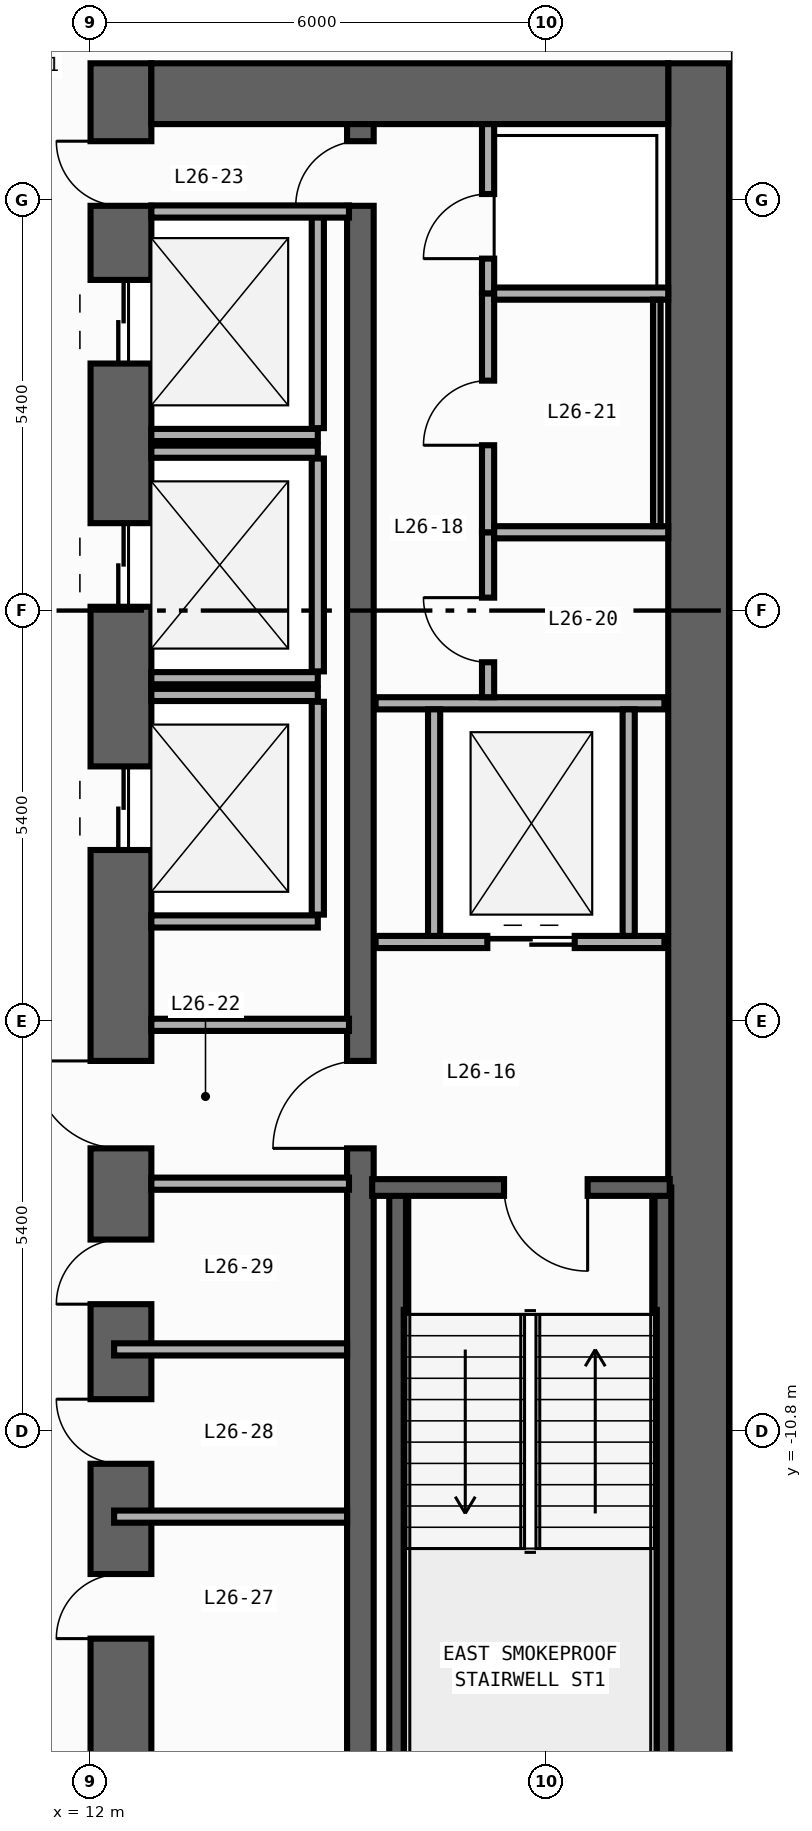
"""IFC4 building model, lengths in metres.
Left out: names, types, materials, properties, quantities, classifications, styles, units other than length and angle.
Written with IfcOpenShell. Run it as: python <this file> out.ifc"""

import sys

from ifc_helpers import new_model, si_unit, direction, frame, frame_2d, origin, place, context, subcontext, project, spatial, rectangle, extrude, element, fill, save


model = new_model("IFC4")
c1 = context("Model", 3, precision=1e-05, world=origin(), true_north=direction((0.0, 1.0)))
c2 = subcontext(c1, "Body", "Model", "MODEL_VIEW")
j1 = project(units=[si_unit("LENGTHUNIT", "METRE"), si_unit("PLANEANGLEUNIT", "RADIAN")], contexts=[c1])
p1 = place(None, origin())
s1 = spatial("IfcSite", under=j1, at=p1, CompositionType="ELEMENT")
p2 = place(p1, origin())
s2 = spatial("IfcBuilding", under=s1, at=p2, CompositionType="ELEMENT")
p3 = place(p2, frame((0.0, 0.0, 114.2)))
s3 = spatial("IfcBuildingStorey", under=s2, at=p3, CompositionType="ELEMENT", Elevation=114.2)
p4 = place(p3, frame((12.4, -19.8, 0.0), z_axis=(0.0, 0.0, 1.0), x_axis=(0.0, 1.0, 0.0)))
e1 = element("IfcWall", 1, at=p4, inside=s3, PredefinedType="SHEAR", context=c2, shape_type="SweptSolid", body=[
    extrude(rectangle(XDim=27.0, YDim=0.8, at=frame_2d((13.5, 0.0))), origin(), (0.0, 0.0, 1.0), 3.94),
])
p5 = place(p4, frame((23.05, 0.0, 0.0)))
e2 = element("IfcOpeningElement", 2, at=p5, cuts=e1, PredefinedType="OPENING", context=c2, shape_type="SweptSolid", body=[
    extrude(rectangle(XDim=1.1, YDim=2.2, at=frame_2d((0.55, 1.1))), frame((0.0, 0.41, 0.0), z_axis=(0.0, -1.0, 0.0), x_axis=(1.0, 0.0, 0.0)), (0.0, 0.0, 1.0), 0.82),
])
p6 = place(p4, frame((19.85, 0.0, 0.0)))
e3 = element("IfcOpeningElement", 3, at=p6, cuts=e1, PredefinedType="OPENING", context=c2, shape_type="SweptSolid", body=[
    extrude(rectangle(XDim=1.1, YDim=2.2, at=frame_2d((0.55, 1.1))), frame((0.0, 0.41, 0.0), z_axis=(0.0, -1.0, 0.0), x_axis=(1.0, 0.0, 0.0)), (0.0, 0.0, 1.0), 0.82),
])
p7 = place(p4, frame((16.65, 0.0, 0.0)))
e4 = element("IfcOpeningElement", 4, at=p7, cuts=e1, PredefinedType="OPENING", context=c2, shape_type="SweptSolid", body=[
    extrude(rectangle(XDim=1.1, YDim=2.2, at=frame_2d((0.55, 1.1))), frame((0.0, 0.41, 0.0), z_axis=(0.0, -1.0, 0.0), x_axis=(1.0, 0.0, 0.0)), (0.0, 0.0, 1.0), 0.82),
])
p8 = place(p4, frame((6.275, 0.0, 0.0)))
e5 = element("IfcOpeningElement", 5, at=p8, cuts=e1, PredefinedType="OPENING", context=c2, shape_type="SweptSolid", body=[
    extrude(rectangle(XDim=0.85, YDim=2.1, at=frame_2d((0.425, 1.05))), frame((0.0, 0.41, 0.0), z_axis=(0.0, -1.0, 0.0), x_axis=(1.0, 0.0, 0.0)), (0.0, 0.0, 1.0), 0.82),
])
p9 = place(p4, frame((8.575, 0.0, 0.0)))
e6 = element("IfcOpeningElement", 6, at=p9, cuts=e1, PredefinedType="OPENING", context=c2, shape_type="SweptSolid", body=[
    extrude(rectangle(XDim=0.85, YDim=2.1, at=frame_2d((0.425, 1.05))), frame((0.0, 0.41, 0.0), z_axis=(0.0, -1.0, 0.0), x_axis=(1.0, 0.0, 0.0)), (0.0, 0.0, 1.0), 0.82),
])
p10 = place(p4, frame((10.675, 0.0, 0.0)))
e7 = element("IfcOpeningElement", 7, at=p10, cuts=e1, PredefinedType="OPENING", context=c2, shape_type="SweptSolid", body=[
    extrude(rectangle(XDim=0.85, YDim=2.1, at=frame_2d((0.425, 1.05))), frame((0.0, 0.41, 0.0), z_axis=(0.0, -1.0, 0.0), x_axis=(1.0, 0.0, 0.0)), (0.0, 0.0, 1.0), 0.82),
])
p11 = place(p4, frame((12.725, 0.0, 0.0)))
e8 = element("IfcOpeningElement", 8, at=p11, cuts=e1, PredefinedType="OPENING", context=c2, shape_type="SweptSolid", body=[
    extrude(rectangle(XDim=1.15, YDim=2.2, at=frame_2d((0.575, 1.1))), frame((0.0, 0.41, 0.0), z_axis=(0.0, -1.0, 0.0), x_axis=(1.0, 0.0, 0.0)), (0.0, 0.0, 1.0), 0.82),
])
p12 = place(p4, frame((25.125, 0.0, 0.0)))
e9 = element("IfcOpeningElement", 9, at=p12, cuts=e1, PredefinedType="OPENING", context=c2, shape_type="SweptSolid", body=[
    extrude(rectangle(XDim=0.85, YDim=2.1, at=frame_2d((0.425, 1.05))), frame((0.0, 0.41, 0.0), z_axis=(0.0, -1.0, 0.0), x_axis=(1.0, 0.0, 0.0)), (0.0, 0.0, 1.0), 0.82),
])
p13 = place(p3, frame((20.0, -19.8, 0.0), z_axis=(0.0, 0.0, 1.0), x_axis=(0.0, 1.0, 0.0)))
e10 = element("IfcWall", 10, at=p13, inside=s3, PredefinedType="SHEAR", context=c2, shape_type="SweptSolid", body=[
    extrude(rectangle(XDim=27.0, YDim=0.8, at=frame_2d((13.5, 0.0))), origin(), (0.0, 0.0, 1.0), 3.94),
])
p14 = place(p3, frame((12.8, 6.8, 0.0), z_axis=(0.0, 0.0, 1.0), x_axis=(1.0, 0.0, 0.0)))
e11 = element("IfcWall", 11, at=p14, inside=s3, PredefinedType="SHEAR", context=c2, shape_type="SweptSolid", body=[
    extrude(rectangle(XDim=6.8, YDim=0.8, at=frame_2d((3.4, 0.0))), origin(), (0.0, 0.0, 1.0), 3.94),
])
p15 = place(p3, frame((15.55, -19.0, 0.0), z_axis=(0.0, 0.0, 1.0), x_axis=(0.0, 1.0, 0.0)))
e12 = element("IfcWall", 12, at=p15, inside=s3, PredefinedType="SHEAR", context=c2, shape_type="SweptSolid", body=[
    extrude(rectangle(XDim=25.4, YDim=0.35, at=frame_2d((12.7, 0.0))), origin(), (0.0, 0.0, 1.0), 3.94),
])
p16 = place(p15, frame((11.925, 0.0, 0.0)))
e13 = element("IfcOpeningElement", 13, at=p16, cuts=e12, PredefinedType="OPENING", context=c2, shape_type="SweptSolid", body=[
    extrude(rectangle(XDim=1.15, YDim=2.2, at=frame_2d((0.575, 1.1))), frame((0.0, 0.185, 0.0), z_axis=(0.0, -1.0, 0.0), x_axis=(1.0, 0.0, 0.0)), (0.0, 0.0, 1.0), 0.37),
])
p17 = place(p15, frame((24.325, 0.0, 0.0)))
e14 = element("IfcOpeningElement", 14, at=p17, cuts=e12, PredefinedType="OPENING", context=c2, shape_type="SweptSolid", body=[
    extrude(rectangle(XDim=0.85, YDim=2.1, at=frame_2d((0.425, 1.05))), frame((0.0, 0.185, 0.0), z_axis=(0.0, -1.0, 0.0), x_axis=(1.0, 0.0, 0.0)), (0.0, 0.0, 1.0), 0.37),
])
for number, where, z_axis, x_axis in (
    (15, (16.04, -18.89, 0.0), (0.0, 0.0, 1.0), (0.0, 1.0, 0.0)),
    (16, (19.53, -18.89, 0.0), (0.0, 0.0, 1.0), (0.0, 1.0, 0.0)),
):
    element("IfcWall", number, at=place(p3, frame(where, z_axis=z_axis, x_axis=x_axis)), inside=s3, PredefinedType="SHEAR", context=c2, shape_type="SweptSolid", body=[
        extrude(rectangle(XDim=11.3, YDim=0.22, at=frame_2d((5.65, 0.0))), origin(), (0.0, 0.0, 1.0), 3.94),
    ])
p18 = place(p3, frame((19.62, -7.59, 0.0), z_axis=(0.0, 0.0, 1.0), x_axis=(-1.0, 0.0, 0.0)))
e17 = element("IfcWall", 17, at=p18, inside=s3, PredefinedType="SHEAR", context=c2, shape_type="SweptSolid", body=[
    extrude(rectangle(XDim=3.915, YDim=0.22, at=frame_2d((1.958, 0.0))), origin(), (0.0, 0.0, 1.0), 3.94),
])
p19 = place(p18, frame((1.08, 0.0, 0.0)))
e18 = element("IfcOpeningElement", 18, at=p19, cuts=e17, PredefinedType="OPENING", context=c2, shape_type="SweptSolid", body=[
    extrude(rectangle(XDim=1.1, YDim=2.2, at=frame_2d((0.55, 1.1))), frame((0.0, 0.12, 0.0), z_axis=(0.0, -1.0, 0.0), x_axis=(1.0, 0.0, 0.0)), (0.0, 0.0, 1.0), 0.24),
])
p20 = place(p3, frame((12.8, 2.31, 0.0), z_axis=(0.0, 0.0, 1.0), x_axis=(1.0, 0.0, 0.0)))
e19 = element("IfcWall", 19, at=p20, inside=s3, PredefinedType="STANDARD", context=c2, shape_type="SweptSolid", body=[
    extrude(rectangle(XDim=2.19, YDim=0.16, at=frame_2d((1.095, 0.0))), origin(), (0.0, 0.0, 1.0), 3.94),
])
p21 = place(p3, frame((14.99, 2.4, 0.0), z_axis=(0.0, 0.0, 1.0), x_axis=(0.0, 1.0, 0.0)))
e20 = element("IfcWall", 20, at=p21, inside=s3, PredefinedType="STANDARD", context=c2, shape_type="SweptSolid", body=[
    extrude(rectangle(XDim=2.8, YDim=0.16, at=frame_2d((1.4, 0.0))), origin(), (0.0, 0.0, 1.0), 3.94),
])
for number, where, z_axis, x_axis in (
    (21, (12.8, -0.89, 0.0), (0.0, 0.0, 1.0), (1.0, 0.0, 0.0)),
    (22, (12.8, 2.09, 0.0), (0.0, 0.0, 1.0), (1.0, 0.0, 0.0)),
):
    element("IfcWall", number, at=place(p3, frame(where, z_axis=z_axis, x_axis=x_axis)), inside=s3, PredefinedType="STANDARD", context=c2, shape_type="SweptSolid", body=[
        extrude(rectangle(XDim=2.19, YDim=0.16, at=frame_2d((1.095, 0.0))), origin(), (0.0, 0.0, 1.0), 3.94),
    ])
p22 = place(p3, frame((14.99, -0.8, 0.0), z_axis=(0.0, 0.0, 1.0), x_axis=(0.0, 1.0, 0.0)))
e23 = element("IfcWall", 23, at=p22, inside=s3, PredefinedType="STANDARD", context=c2, shape_type="SweptSolid", body=[
    extrude(rectangle(XDim=2.8, YDim=0.16, at=frame_2d((1.4, 0.0))), origin(), (0.0, 0.0, 1.0), 3.94),
])
for number, where, z_axis, x_axis in (
    (24, (12.8, -4.09, 0.0), (0.0, 0.0, 1.0), (1.0, 0.0, 0.0)),
    (25, (12.8, -1.11, 0.0), (0.0, 0.0, 1.0), (1.0, 0.0, 0.0)),
):
    element("IfcWall", number, at=place(p3, frame(where, z_axis=z_axis, x_axis=x_axis)), inside=s3, PredefinedType="STANDARD", context=c2, shape_type="SweptSolid", body=[
        extrude(rectangle(XDim=2.19, YDim=0.16, at=frame_2d((1.095, 0.0))), origin(), (0.0, 0.0, 1.0), 3.94),
    ])
p23 = place(p3, frame((14.99, -4.0, 0.0), z_axis=(0.0, 0.0, 1.0), x_axis=(0.0, 1.0, 0.0)))
e26 = element("IfcWall", 26, at=p23, inside=s3, PredefinedType="STANDARD", context=c2, shape_type="SweptSolid", body=[
    extrude(rectangle(XDim=2.8, YDim=0.16, at=frame_2d((1.4, 0.0))), origin(), (0.0, 0.0, 1.0), 3.94),
])
p24 = place(p3, frame((15.75, -4.36, 0.0), z_axis=(0.0, 0.0, 1.0), x_axis=(1.0, 0.0, 0.0)))
e27 = element("IfcWall", 27, at=p24, inside=s3, PredefinedType="STANDARD", context=c2, shape_type="SweptSolid", body=[
    extrude(rectangle(XDim=3.8, YDim=0.16, at=frame_2d((1.9, 0.0))), origin(), (0.0, 0.0, 1.0), 3.94),
])
p25 = place(p24, frame((1.47, 0.0, 0.0)))
e28 = element("IfcOpeningElement", 28, at=p25, cuts=e27, PredefinedType="OPENING", context=c2, shape_type="SweptSolid", body=[
    extrude(rectangle(XDim=1.15, YDim=2.2, at=frame_2d((0.575, 1.1))), frame((0.0, 0.09, 0.0), z_axis=(0.0, -1.0, 0.0), x_axis=(1.0, 0.0, 0.0)), (0.0, 0.0, 1.0), 0.18),
])
p26 = place(p3, frame((15.75, -1.22, 0.0), z_axis=(0.0, 0.0, 1.0), x_axis=(1.0, 0.0, 0.0)))
e29 = element("IfcWall", 29, at=p26, inside=s3, PredefinedType="STANDARD", context=c2, shape_type="SweptSolid", body=[
    extrude(rectangle(XDim=3.8, YDim=0.16, at=frame_2d((1.9, 0.0))), origin(), (0.0, 0.0, 1.0), 3.94),
])
for number, where, z_axis, x_axis in (
    (30, (16.52, -4.28, 0.0), (0.0, 0.0, 1.0), (0.0, 1.0, 0.0)),
    (31, (19.08, -4.28, 0.0), (0.0, 0.0, 1.0), (0.0, 1.0, 0.0)),
):
    element("IfcWall", number, at=place(p3, frame(where, z_axis=z_axis, x_axis=x_axis)), inside=s3, PredefinedType="STANDARD", context=c2, shape_type="SweptSolid", body=[
        extrude(rectangle(XDim=2.98, YDim=0.16, at=frame_2d((1.49, 0.0))), origin(), (0.0, 0.0, 1.0), 3.94),
    ])
for number, where, z_axis, x_axis in (
    (32, (12.8, -5.45, 0.0), (0.0, 0.0, 1.0), (1.0, 0.0, 0.0)),
    (33, (12.8, -7.54, 0.0), (0.0, 0.0, 1.0), (1.0, 0.0, 0.0)),
    (34, (12.8, 5.25, 0.0), (0.0, 0.0, 1.0), (1.0, 0.0, 0.0)),
):
    element("IfcWall", number, at=place(p3, frame(where, z_axis=z_axis, x_axis=x_axis)), inside=s3, PredefinedType="STANDARD", context=c2, shape_type="SweptSolid", body=[
        extrude(rectangle(XDim=2.6, YDim=0.16, at=frame_2d((1.3, 0.0))), origin(), (0.0, 0.0, 1.0), 3.94),
    ])
p27 = place(p3, frame((17.23, 4.17, 0.0), z_axis=(0.0, 0.0, 1.0), x_axis=(0.0, 1.0, 0.0)))
e35 = element("IfcWall", 35, at=p27, inside=s3, PredefinedType="PARTITIONING", context=c2, shape_type="SweptSolid", body=[
    extrude(rectangle(XDim=2.23, YDim=0.16, at=frame_2d((1.115, 0.0))), origin(), (0.0, 0.0, 1.0), 3.94),
])
p28 = place(p27, frame((0.46, 0.0, 0.0)))
e36 = element("IfcOpeningElement", 36, at=p28, cuts=e35, PredefinedType="OPENING", context=c2, shape_type="SweptSolid", body=[
    extrude(rectangle(XDim=0.85, YDim=2.1, at=frame_2d((0.425, 1.05))), frame((0.0, 0.09, 0.0), z_axis=(0.0, -1.0, 0.0), x_axis=(1.0, 0.0, 0.0)), (0.0, 0.0, 1.0), 0.18),
])
p29 = place(p3, frame((17.23, -1.14, 0.0), z_axis=(0.0, 0.0, 1.0), x_axis=(0.0, 1.0, 0.0)))
e37 = element("IfcWall", 37, at=p29, inside=s3, PredefinedType="PARTITIONING", context=c2, shape_type="SweptSolid", body=[
    extrude(rectangle(XDim=2.17, YDim=0.16, at=frame_2d((1.085, 0.0))), origin(), (0.0, 0.0, 1.0), 3.94),
])
p30 = place(p29, frame((0.46, 0.0, 0.0)))
e38 = element("IfcOpeningElement", 38, at=p30, cuts=e37, PredefinedType="OPENING", context=c2, shape_type="SweptSolid", body=[
    extrude(rectangle(XDim=0.85, YDim=2.1, at=frame_2d((0.425, 1.05))), frame((0.0, 0.09, 0.0), z_axis=(0.0, -1.0, 0.0), x_axis=(1.0, 0.0, 0.0)), (0.0, 0.0, 1.0), 0.18),
])
p31 = place(p3, frame((17.23, 1.03, 0.0), z_axis=(0.0, 0.0, 1.0), x_axis=(0.0, 1.0, 0.0)))
e39 = element("IfcWall", 39, at=p31, inside=s3, PredefinedType="PARTITIONING", context=c2, shape_type="SweptSolid", body=[
    extrude(rectangle(XDim=3.14, YDim=0.16, at=frame_2d((1.57, 0.0))), origin(), (0.0, 0.0, 1.0), 3.94),
])
p32 = place(p31, frame((1.145, 0.0, 0.0)))
e40 = element("IfcOpeningElement", 40, at=p32, cuts=e39, PredefinedType="OPENING", context=c2, shape_type="SweptSolid", body=[
    extrude(rectangle(XDim=0.85, YDim=2.1, at=frame_2d((0.425, 1.05))), frame((0.0, 0.09, 0.0), z_axis=(0.0, -1.0, 0.0), x_axis=(1.0, 0.0, 0.0)), (0.0, 0.0, 1.0), 0.18),
])
for number, where, z_axis, x_axis in (
    (41, (17.31, 4.17, 0.0), (0.0, 0.0, 1.0), (1.0, 0.0, 0.0)),
    (42, (17.31, 1.03, 0.0), (0.0, 0.0, 1.0), (1.0, 0.0, 0.0)),
):
    element("IfcWall", number, at=place(p3, frame(where, z_axis=z_axis, x_axis=x_axis)), inside=s3, PredefinedType="PARTITIONING", context=c2, shape_type="SweptSolid", body=[
        extrude(rectangle(XDim=2.29, YDim=0.16, at=frame_2d((1.145, 0.0))), origin(), (0.0, 0.0, 1.0), 3.94),
    ])
for number, where, z_axis, x_axis in (
    (43, (12.31, -11.92, 0.0), (0.0, 0.0, 1.0), (1.0, 0.0, 0.0)),
    (44, (12.31, -9.72, 0.0), (0.0, 0.0, 1.0), (1.0, 0.0, 0.0)),
):
    element("IfcWall", number, at=place(p3, frame(where, z_axis=z_axis, x_axis=x_axis)), inside=s3, PredefinedType="PARTITIONING", context=c2, shape_type="SweptSolid", body=[
        extrude(rectangle(XDim=3.065, YDim=0.16, at=frame_2d((1.532, 0.0))), origin(), (0.0, 0.0, 1.0), 3.94),
    ])
p33 = place(p3, frame((19.45, 4.09, 0.0), z_axis=(0.0, 0.0, 1.0), x_axis=(0.0, -1.0, 0.0)))
e45 = element("IfcWall", 45, at=p33, inside=s3, PredefinedType="PARTITIONING", context=c2, shape_type="SweptSolid", body=[
    extrude(rectangle(XDim=2.98, YDim=0.1, at=frame_2d((1.49, 0.0))), origin(), (0.0, 0.0, 1.0), 3.94),
])
p34 = place(p19, origin())
e46 = element("IfcDoor", 46, at=p34, inside=s3, OperationType="SINGLE_SWING_LEFT", PredefinedType="DOOR", context=c2, shape_type="SweptSolid", body=[
    extrude(rectangle(XDim=1.1, YDim=2.2, at=frame_2d((0.55, 1.1))), frame((0.0, 0.025, 0.0), z_axis=(0.0, -1.0, 0.0), x_axis=(1.0, 0.0, 0.0)), (0.0, 0.0, 1.0), 0.05),
])
fill(e18, e46)
p35 = place(p5, origin())
e47 = element("IfcDoor", 47, at=p35, inside=s3, OperationType="DOUBLE_DOOR_SLIDING", PredefinedType="DOOR", context=c2, shape_type="SweptSolid", body=[
    extrude(rectangle(XDim=1.1, YDim=2.2, at=frame_2d((0.55, 1.1))), frame((0.0, 0.025, 0.0), z_axis=(0.0, -1.0, 0.0), x_axis=(1.0, 0.0, 0.0)), (0.0, 0.0, 1.0), 0.05),
])
fill(e2, e47)
p36 = place(p6, origin())
e48 = element("IfcDoor", 48, at=p36, inside=s3, OperationType="DOUBLE_DOOR_SLIDING", PredefinedType="DOOR", context=c2, shape_type="SweptSolid", body=[
    extrude(rectangle(XDim=1.1, YDim=2.2, at=frame_2d((0.55, 1.1))), frame((0.0, 0.025, 0.0), z_axis=(0.0, -1.0, 0.0), x_axis=(1.0, 0.0, 0.0)), (0.0, 0.0, 1.0), 0.05),
])
fill(e3, e48)
p37 = place(p7, origin())
e49 = element("IfcDoor", 49, at=p37, inside=s3, OperationType="DOUBLE_DOOR_SLIDING", PredefinedType="DOOR", context=c2, shape_type="SweptSolid", body=[
    extrude(rectangle(XDim=1.1, YDim=2.2, at=frame_2d((0.55, 1.1))), frame((0.0, 0.025, 0.0), z_axis=(0.0, -1.0, 0.0), x_axis=(1.0, 0.0, 0.0)), (0.0, 0.0, 1.0), 0.05),
])
fill(e4, e49)
p38 = place(p8, origin())
e50 = element("IfcDoor", 50, at=p38, inside=s3, OperationType="SINGLE_SWING_LEFT", PredefinedType="DOOR", context=c2, shape_type="SweptSolid", body=[
    extrude(rectangle(XDim=0.85, YDim=2.1, at=frame_2d((0.425, 1.05))), frame((0.0, 0.025, 0.0), z_axis=(0.0, -1.0, 0.0), x_axis=(1.0, 0.0, 0.0)), (0.0, 0.0, 1.0), 0.05),
])
fill(e5, e50)
p39 = place(p9, origin())
e51 = element("IfcDoor", 51, at=p39, inside=s3, OperationType="SINGLE_SWING_RIGHT", PredefinedType="DOOR", context=c2, shape_type="SweptSolid", body=[
    extrude(rectangle(XDim=0.85, YDim=2.1, at=frame_2d((0.425, 1.05))), frame((0.0, 0.025, 0.0), z_axis=(0.0, -1.0, 0.0), x_axis=(1.0, 0.0, 0.0)), (0.0, 0.0, 1.0), 0.05),
])
fill(e6, e51)
p40 = place(p10, origin())
e52 = element("IfcDoor", 52, at=p40, inside=s3, OperationType="SINGLE_SWING_LEFT", PredefinedType="DOOR", context=c2, shape_type="SweptSolid", body=[
    extrude(rectangle(XDim=0.85, YDim=2.1, at=frame_2d((0.425, 1.05))), frame((0.0, 0.025, 0.0), z_axis=(0.0, -1.0, 0.0), x_axis=(1.0, 0.0, 0.0)), (0.0, 0.0, 1.0), 0.05),
])
fill(e7, e52)
p41 = place(p11, origin())
e53 = element("IfcDoor", 53, at=p41, inside=s3, OperationType="SINGLE_SWING_RIGHT", PredefinedType="DOOR", context=c2, shape_type="SweptSolid", body=[
    extrude(rectangle(XDim=1.15, YDim=2.2, at=frame_2d((0.575, 1.1))), frame((0.0, 0.025, 0.0), z_axis=(0.0, -1.0, 0.0), x_axis=(1.0, 0.0, 0.0)), (0.0, 0.0, 1.0), 0.05),
])
fill(e8, e53)
p42 = place(p16, origin())
e54 = element("IfcDoor", 54, at=p42, inside=s3, OperationType="SINGLE_SWING_LEFT", PredefinedType="DOOR", context=c2, shape_type="SweptSolid", body=[
    extrude(rectangle(XDim=1.15, YDim=2.2, at=frame_2d((0.575, 1.1))), frame((0.0, 0.025, 0.0), z_axis=(0.0, -1.0, 0.0), x_axis=(1.0, 0.0, 0.0)), (0.0, 0.0, 1.0), 0.05),
])
fill(e13, e54)
p43 = place(p12, origin())
e55 = element("IfcDoor", 55, at=p43, inside=s3, OperationType="SINGLE_SWING_RIGHT", PredefinedType="DOOR", context=c2, shape_type="SweptSolid", body=[
    extrude(rectangle(XDim=0.85, YDim=2.1, at=frame_2d((0.425, 1.05))), frame((0.0, 0.025, 0.0), z_axis=(0.0, -1.0, 0.0), x_axis=(1.0, 0.0, 0.0)), (0.0, 0.0, 1.0), 0.05),
])
fill(e9, e55)
p44 = place(p17, origin())
e56 = element("IfcDoor", 56, at=p44, inside=s3, OperationType="SINGLE_SWING_LEFT", PredefinedType="DOOR", context=c2, shape_type="SweptSolid", body=[
    extrude(rectangle(XDim=0.85, YDim=2.1, at=frame_2d((0.425, 1.05))), frame((0.0, 0.025, 0.0), z_axis=(0.0, -1.0, 0.0), x_axis=(1.0, 0.0, 0.0)), (0.0, 0.0, 1.0), 0.05),
])
fill(e14, e56)
p45 = place(p25, origin())
e57 = element("IfcDoor", 57, at=p45, inside=s3, OperationType="DOUBLE_DOOR_SLIDING", PredefinedType="DOOR", context=c2, shape_type="SweptSolid", body=[
    extrude(rectangle(XDim=1.15, YDim=2.2, at=frame_2d((0.575, 1.1))), frame((0.0, 0.025, 0.0), z_axis=(0.0, -1.0, 0.0), x_axis=(1.0, 0.0, 0.0)), (0.0, 0.0, 1.0), 0.05),
])
fill(e28, e57)
p46 = place(p28, origin())
e58 = element("IfcDoor", 58, at=p46, inside=s3, OperationType="SINGLE_SWING_LEFT", PredefinedType="DOOR", context=c2, shape_type="SweptSolid", body=[
    extrude(rectangle(XDim=0.85, YDim=2.1, at=frame_2d((0.425, 1.05))), frame((0.0, 0.025, 0.0), z_axis=(0.0, -1.0, 0.0), x_axis=(1.0, 0.0, 0.0)), (0.0, 0.0, 1.0), 0.05),
])
fill(e36, e58)
p47 = place(p30, origin())
e59 = element("IfcDoor", 59, at=p47, inside=s3, OperationType="SINGLE_SWING_RIGHT", PredefinedType="DOOR", context=c2, shape_type="SweptSolid", body=[
    extrude(rectangle(XDim=0.85, YDim=2.1, at=frame_2d((0.425, 1.05))), frame((0.0, 0.025, 0.0), z_axis=(0.0, -1.0, 0.0), x_axis=(1.0, 0.0, 0.0)), (0.0, 0.0, 1.0), 0.05),
])
fill(e38, e59)
p48 = place(p32, origin())
e60 = element("IfcDoor", 60, at=p48, inside=s3, OperationType="SINGLE_SWING_LEFT", PredefinedType="DOOR", context=c2, shape_type="SweptSolid", body=[
    extrude(rectangle(XDim=0.85, YDim=2.1, at=frame_2d((0.425, 1.05))), frame((0.0, 0.025, 0.0), z_axis=(0.0, -1.0, 0.0), x_axis=(1.0, 0.0, 0.0)), (0.0, 0.0, 1.0), 0.05),
])
fill(e40, e60)
save(model, sys.argv[1])
